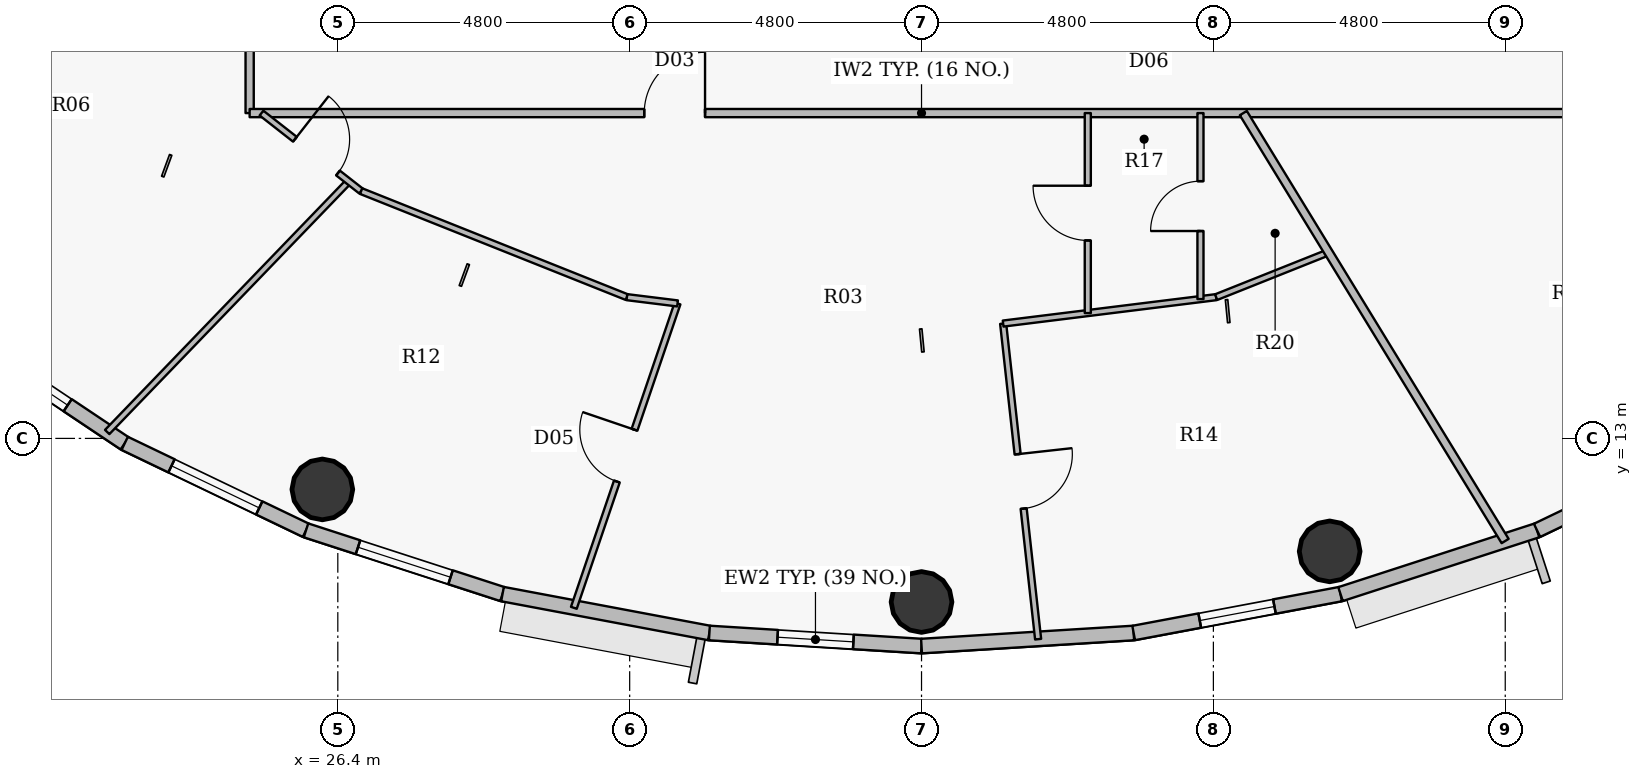
"""IFC4 building model, lengths in metres.
Left out: names, types, materials, properties, quantities, classifications, styles, units other than length and angle.
Written with IfcOpenShell. Run it as: python <this file> out.ifc"""

import sys

from ifc_helpers import new_model, si_unit, direction, frame, frame_2d, origin, origin_2d, place, context, subcontext, project, spatial, rectangle, hollow_circle, extrude, source, transform, mapped, element, fill, save


model = new_model("IFC4")
c1 = context("Model", 3, precision=1e-05, world=origin(), true_north=direction((0.0, 1.0)))
c2 = subcontext(c1, "Body", "Model", "MODEL_VIEW")
j1 = project(units=[si_unit("LENGTHUNIT", "METRE"), si_unit("PLANEANGLEUNIT", "RADIAN")], contexts=[c1])
p1 = place(None, origin())
s1 = spatial("IfcSite", under=j1, at=p1, CompositionType="ELEMENT")
p2 = place(p1, origin())
s2 = spatial("IfcBuilding", under=s1, at=p2, CompositionType="ELEMENT")
p3 = place(p2, frame((0.0, 0.0, 291.75)))
s3 = spatial("IfcBuildingStorey", under=s2, at=p3, CompositionType="ELEMENT", Elevation=291.75)
for number, where, z_axis, x_axis in (
    (1, (26.146, 12.161, 0.0), (0.0, 0.0, 1.0), (1.0, 0.0, 0.0)),
    (2, (36.0, 10.31, 0.0), (0.0, 0.0, 1.0), (1.0, 0.0, 0.0)),
    (3, (42.712, 11.142, 0.0), (0.0, 0.0, 1.0), (1.0, 0.0, 0.0)),
):
    element("IfcColumn", number, at=place(p3, frame(where, z_axis=z_axis, x_axis=x_axis)), inside=s3, PredefinedType="COLUMN", context=c2, shape_type="SweptSolid", body=[
        extrude(hollow_circle(Radius=0.5, WallThickness=0.032, at=origin_2d()), origin(), (0.0, 0.0, 1.0), 3.75),
    ])
p4 = place(p3, frame((22.896, 12.918, 0.0), z_axis=(0.0, 0.0, 1.0), x_axis=(-0.831250592635, 0.55589787933, 0.0)))
e4 = element("IfcWall", 4, at=p4, inside=s3, PredefinedType="SOLIDWALL", context=c2, shape_type="SweptSolid", body=[
    extrude(rectangle(XDim=3.197, YDim=0.24, at=frame_2d((1.599, 0.0))), origin(), (0.0, 0.0, 1.0), 3.5),
])
p5 = place(p4, frame((1.129, 0.0, 0.9)))
e5 = element("IfcOpeningElement", 5, at=p5, cuts=e4, PredefinedType="OPENING", context=c2, shape_type="SweptSolid", body=[
    extrude(rectangle(XDim=1.25, YDim=1.65, at=origin_2d()), frame((0.625, 0.13, 0.825), z_axis=(0.0, -1.0, 0.0), x_axis=(1.0, 0.0, 0.0)), (0.0, 0.0, 1.0), 0.26),
])
p6 = place(p3, frame((25.877, 11.488, 0.0), z_axis=(0.0, 0.0, 1.0), x_axis=(-0.901573741254, 0.43262546051, 0.0)))
e6 = element("IfcWall", 6, at=p6, inside=s3, PredefinedType="SOLIDWALL", context=c2, shape_type="SweptSolid", body=[
    extrude(rectangle(XDim=3.307, YDim=0.24, at=frame_2d((1.653, 0.0))), origin(), (0.0, 0.0, 1.0), 3.5),
])
p7 = place(p6, frame((0.853, 0.0, 0.9)))
e7 = element("IfcOpeningElement", 7, at=p7, cuts=e6, PredefinedType="OPENING", context=c2, shape_type="SweptSolid", body=[
    extrude(rectangle(XDim=1.6, YDim=1.75, at=origin_2d()), frame((0.8, 0.13, 0.875), z_axis=(0.0, -1.0, 0.0), x_axis=(1.0, 0.0, 0.0)), (0.0, 0.0, 1.0), 0.26),
])
p8 = place(p3, frame((29.109, 10.44, 0.0), z_axis=(0.0, 0.0, 1.0), x_axis=(-0.95123136723, 0.308478339592, 0.0)))
e8 = element("IfcWall", 8, at=p8, inside=s3, PredefinedType="SOLIDWALL", context=c2, shape_type="SweptSolid", body=[
    extrude(rectangle(XDim=3.398, YDim=0.24, at=frame_2d((1.699, 0.0))), origin(), (0.0, 0.0, 1.0), 3.5),
])
p9 = place(p8, frame((0.899, 0.0, 0.9)))
e9 = element("IfcOpeningElement", 9, at=p9, cuts=e8, PredefinedType="OPENING", context=c2, shape_type="SweptSolid", body=[
    extrude(rectangle(XDim=1.6, YDim=1.75, at=origin_2d()), frame((0.8, 0.13, 0.875), z_axis=(0.0, -1.0, 0.0), x_axis=(1.0, 0.0, 0.0)), (0.0, 0.0, 1.0), 0.26),
])
p10 = place(p3, frame((32.511, 9.8, 0.0), z_axis=(0.0, 0.0, 1.0), x_axis=(-0.982782655757, 0.184765395959, 0.0)))
e10 = element("IfcWall", 10, at=p10, inside=s3, PredefinedType="SOLIDWALL", context=c2, shape_type="SweptSolid", body=[
    extrude(rectangle(XDim=3.462, YDim=0.24, at=frame_2d((1.731, 0.0))), origin(), (0.0, 0.0, 1.0), 3.5),
])
p11 = place(p3, frame((36.0, 9.585, 0.0), z_axis=(0.0, 0.0, 1.0), x_axis=(-0.998104946479, 0.061534671648, 0.0)))
e11 = element("IfcWall", 11, at=p11, inside=s3, PredefinedType="SOLIDWALL", context=c2, shape_type="SweptSolid", body=[
    extrude(rectangle(XDim=3.495, YDim=0.24, at=frame_2d((1.748, 0.0))), origin(), (0.0, 0.0, 1.0), 3.5),
])
p12 = place(p11, frame((1.123, 0.0, 0.9)))
e12 = element("IfcOpeningElement", 12, at=p12, cuts=e11, PredefinedType="OPENING", context=c2, shape_type="SweptSolid", body=[
    extrude(rectangle(XDim=1.25, YDim=1.65, at=origin_2d()), frame((0.625, 0.13, 0.825), z_axis=(0.0, -1.0, 0.0), x_axis=(1.0, 0.0, 0.0)), (0.0, 0.0, 1.0), 0.26),
])
p13 = place(p3, frame((39.489, 9.8, 0.0), z_axis=(0.0, 0.0, 1.0), x_axis=(-0.998104946479, -0.061534671648, 0.0)))
e13 = element("IfcWall", 13, at=p13, inside=s3, PredefinedType="SOLIDWALL", context=c2, shape_type="SweptSolid", body=[
    extrude(rectangle(XDim=3.495, YDim=0.24, at=frame_2d((1.748, 0.0))), origin(), (0.0, 0.0, 1.0), 3.5),
])
p14 = place(p3, frame((42.891, 10.44, 0.0), z_axis=(0.0, 0.0, 1.0), x_axis=(-0.982782655757, -0.184765395959, 0.0)))
e14 = element("IfcWall", 14, at=p14, inside=s3, PredefinedType="SOLIDWALL", context=c2, shape_type="SweptSolid", body=[
    extrude(rectangle(XDim=3.462, YDim=0.24, at=frame_2d((1.731, 0.0))), origin(), (0.0, 0.0, 1.0), 3.5),
])
p15 = place(p14, frame((1.106, 0.0, 0.9)))
e15 = element("IfcOpeningElement", 15, at=p15, cuts=e14, PredefinedType="OPENING", context=c2, shape_type="SweptSolid", body=[
    extrude(rectangle(XDim=1.25, YDim=1.65, at=origin_2d()), frame((0.625, 0.13, 0.825), z_axis=(0.0, -1.0, 0.0), x_axis=(1.0, 0.0, 0.0)), (0.0, 0.0, 1.0), 0.26),
])
p16 = place(p3, frame((46.123, 11.488, 0.0), z_axis=(0.0, 0.0, 1.0), x_axis=(-0.95123136723, -0.308478339592, 0.0)))
e16 = element("IfcWall", 16, at=p16, inside=s3, PredefinedType="SOLIDWALL", context=c2, shape_type="SweptSolid", body=[
    extrude(rectangle(XDim=3.398, YDim=0.24, at=frame_2d((1.699, 0.0))), origin(), (0.0, 0.0, 1.0), 3.5),
])
p17 = place(p3, frame((49.104, 12.918, 0.0), z_axis=(0.0, 0.0, 1.0), x_axis=(-0.901573741254, -0.43262546051, 0.0)))
e17 = element("IfcWall", 17, at=p17, inside=s3, PredefinedType="SOLIDWALL", context=c2, shape_type="SweptSolid", body=[
    extrude(rectangle(XDim=3.307, YDim=0.24, at=frame_2d((1.653, 0.0))), origin(), (0.0, 0.0, 1.0), 3.5),
])
p18 = place(p17, frame((0.854, 0.0, 0.9)))
e18 = element("IfcOpeningElement", 18, at=p18, cuts=e17, PredefinedType="OPENING", context=c2, shape_type="SweptSolid", body=[
    extrude(rectangle(XDim=1.6, YDim=1.75, at=origin_2d()), frame((0.8, 0.13, 0.875), z_axis=(0.0, -1.0, 0.0), x_axis=(1.0, 0.0, 0.0)), (0.0, 0.0, 1.0), 0.26),
])
p19 = place(p3, frame((16.007, 19.358, 0.0), z_axis=(0.0, 0.0, 1.0), x_axis=(0.934094110355, 0.35702687994, 0.0)))
e19 = element("IfcWall", 19, at=p19, inside=s3, PredefinedType="PARTITIONING", context=c2, shape_type="SweptSolid", body=[
    extrude(rectangle(XDim=9.574, YDim=0.135, at=frame_2d((4.787, 0.0))), origin(), (0.0, 0.0, 1.0), 2.985),
])
p20 = place(p3, frame((22.607, 13.105, 0.0), z_axis=(0.0, 0.0, 1.0), x_axis=(0.693978480191, 0.71999574237, 0.0)))
e20 = element("IfcWall", 20, at=p20, inside=s3, PredefinedType="PARTITIONING", context=c2, shape_type="SweptSolid", body=[
    extrude(rectangle(XDim=5.724, YDim=0.1, at=frame_2d((2.862, 0.0))), origin(), (0.0, 0.0, 1.0), 2.985),
])
p21 = place(p3, frame((24.95, 18.35, 0.0), z_axis=(0.0, 0.0, 1.0), x_axis=(0.0, 1.0, 0.0)))
e21 = element("IfcWall", 21, at=p21, inside=s3, PredefinedType="PARTITIONING", context=c2, shape_type="SweptSolid", body=[
    extrude(rectangle(XDim=11.45, YDim=0.135, at=frame_2d((5.725, 0.0))), origin(), (0.0, 0.0, 1.0), 3.035),
])
p22 = place(p21, frame((7.418, 0.0, 0.0)))
e22 = element("IfcOpeningElement", 22, at=p22, cuts=e21, PredefinedType="OPENING", context=c2, shape_type="SweptSolid", body=[
    extrude(rectangle(XDim=1.0, YDim=2.15, at=origin_2d()), frame((0.5, 0.078, 1.075), z_axis=(0.0, -1.0, 0.0), x_axis=(1.0, 0.0, 0.0)), (0.0, 0.0, 1.0), 0.155),
])
p23 = place(p3, frame((24.95, 18.35, 0.0), z_axis=(0.0, 0.0, 1.0), x_axis=(1.0, 0.0, 0.0)))
e23 = element("IfcWall", 23, at=p23, inside=s3, PredefinedType="PARTITIONING", context=c2, shape_type="SweptSolid", body=[
    extrude(rectangle(XDim=22.1, YDim=0.135, at=frame_2d((11.05, 0.0))), origin(), (0.0, 0.0, 1.0), 3.035),
])
p24 = place(p23, frame((6.49, 0.0, 0.0)))
e24 = element("IfcOpeningElement", 24, at=p24, cuts=e23, PredefinedType="OPENING", context=c2, shape_type="SweptSolid", body=[
    extrude(rectangle(XDim=1.0, YDim=2.15, at=origin_2d()), frame((0.5, 0.078, 1.075), z_axis=(0.0, -1.0, 0.0), x_axis=(1.0, 0.0, 0.0)), (0.0, 0.0, 1.0), 0.155),
])
p25 = place(p3, frame((25.145, 18.35, 0.0), z_axis=(0.0, 0.0, 1.0), x_axis=(0.787326747019, -0.616535962803, 0.0)))
e25 = element("IfcWall", 25, at=p25, inside=s3, PredefinedType="PARTITIONING", context=c2, shape_type="SweptSolid", body=[
    extrude(rectangle(XDim=2.081, YDim=0.1, at=frame_2d((1.041, 0.0))), origin(), (0.0, 0.0, 1.0), 3.5),
])
p26 = place(p25, frame((0.698, 0.0, 0.0)))
e26 = element("IfcOpeningElement", 26, at=p26, cuts=e25, PredefinedType="OPENING", context=c2, shape_type="SweptSolid", body=[
    extrude(rectangle(XDim=0.9, YDim=2.1, at=origin_2d()), frame((0.45, 0.06, 1.05), z_axis=(0.0, -1.0, 0.0), x_axis=(1.0, 0.0, 0.0)), (0.0, 0.0, 1.0), 0.12),
])
p27 = place(p3, frame((26.783, 17.067, 0.0), z_axis=(0.0, 0.0, 1.0), x_axis=(0.928809047774, -0.370558703544, 0.0)))
e27 = element("IfcWall", 27, at=p27, inside=s3, PredefinedType="PARTITIONING", context=c2, shape_type="SweptSolid", body=[
    extrude(rectangle(XDim=4.706, YDim=0.1, at=frame_2d((2.353, 0.0))), origin(), (0.0, 0.0, 1.0), 3.035),
])
p28 = place(p3, frame((30.282, 10.214, 0.0), z_axis=(0.0, 0.0, 1.0), x_axis=(0.322425759237, 0.946594754782, 0.0)))
e28 = element("IfcWall", 28, at=p28, inside=s3, PredefinedType="PARTITIONING", context=c2, shape_type="SweptSolid", body=[
    extrude(rectangle(XDim=5.288, YDim=0.1, at=frame_2d((2.644, 0.0))), origin(), (0.0, 0.0, 1.0), 2.985),
])
p29 = place(p28, frame((2.194, 0.0, 0.0)))
e29 = element("IfcOpeningElement", 29, at=p29, cuts=e28, PredefinedType="OPENING", context=c2, shape_type="SweptSolid", body=[
    extrude(rectangle(XDim=0.9, YDim=2.1, at=origin_2d()), frame((0.45, 0.06, 1.05), z_axis=(0.0, -1.0, 0.0), x_axis=(1.0, 0.0, 0.0)), (0.0, 0.0, 1.0), 0.12),
])
p30 = place(p3, frame((31.155, 15.323, 0.0), z_axis=(0.0, 0.0, 1.0), x_axis=(0.992393849535, -0.123103401277, 0.0)))
e30 = element("IfcWall", 30, at=p30, inside=s3, PredefinedType="PARTITIONING", context=c2, shape_type="SweptSolid", body=[
    extrude(rectangle(XDim=0.839, YDim=0.1, at=frame_2d((0.419, 0.0))), origin(), (0.0, 0.0, 1.0), 3.5),
])
p31 = place(p3, frame((37.342, 14.888, 0.0), z_axis=(0.0, 0.0, 1.0), x_axis=(0.110149295127, -0.993915053102, 0.0)))
e31 = element("IfcWall", 31, at=p31, inside=s3, PredefinedType="PARTITIONING", context=c2, shape_type="SweptSolid", body=[
    extrude(rectangle(XDim=5.222, YDim=0.1, at=frame_2d((2.611, 0.0))), origin(), (0.0, 0.0, 1.0), 2.985),
])
p32 = place(p31, frame((2.161, 0.0, 0.0)))
e32 = element("IfcOpeningElement", 32, at=p32, cuts=e31, PredefinedType="OPENING", context=c2, shape_type="SweptSolid", body=[
    extrude(rectangle(XDim=0.9, YDim=2.1, at=origin_2d()), frame((0.45, 0.06, 1.05), z_axis=(0.0, -1.0, 0.0), x_axis=(1.0, 0.0, 0.0)), (0.0, 0.0, 1.0), 0.12),
])
p33 = place(p3, frame((37.342, 14.888, 0.0), z_axis=(0.0, 0.0, 1.0), x_axis=(0.992393420873, 0.123106856865, 0.0)))
e33 = element("IfcWall", 33, at=p33, inside=s3, PredefinedType="PARTITIONING", context=c2, shape_type="SweptSolid", body=[
    extrude(rectangle(XDim=3.53, YDim=0.1, at=frame_2d((1.765, 0.0))), origin(), (0.0, 0.0, 1.0), 3.035),
])
p34 = place(p3, frame((38.734, 15.061, 0.0), z_axis=(0.0, 0.0, 1.0), x_axis=(0.0, 1.0, 0.0)))
e34 = element("IfcWall", 34, at=p34, inside=s3, PredefinedType="PARTITIONING", context=c2, shape_type="SweptSolid", body=[
    extrude(rectangle(XDim=3.289, YDim=0.1, at=frame_2d((1.645, 0.0))), origin(), (0.0, 0.0, 1.0), 3.5),
])
p35 = place(p34, frame((1.194, 0.0, 0.0)))
e35 = element("IfcOpeningElement", 35, at=p35, cuts=e34, PredefinedType="OPENING", context=c2, shape_type="SweptSolid", body=[
    extrude(rectangle(XDim=0.9, YDim=2.1, at=origin_2d()), frame((0.45, 0.06, 1.05), z_axis=(0.0, -1.0, 0.0), x_axis=(1.0, 0.0, 0.0)), (0.0, 0.0, 1.0), 0.12),
])
p36 = place(p3, frame((40.587, 15.291, 0.0), z_axis=(0.0, 0.0, 1.0), x_axis=(0.0, 1.0, 0.0)))
e36 = element("IfcWall", 36, at=p36, inside=s3, PredefinedType="PARTITIONING", context=c2, shape_type="SweptSolid", body=[
    extrude(rectangle(XDim=3.059, YDim=0.1, at=frame_2d((1.53, 0.0))), origin(), (0.0, 0.0, 1.0), 3.035),
])
p37 = place(p36, frame((1.119, 0.0, 0.0)))
e37 = element("IfcOpeningElement", 37, at=p37, cuts=e36, PredefinedType="OPENING", context=c2, shape_type="SweptSolid", body=[
    extrude(rectangle(XDim=0.82, YDim=2.1, at=origin_2d()), frame((0.41, 0.06, 1.05), z_axis=(0.0, -1.0, 0.0), x_axis=(1.0, 0.0, 0.0)), (0.0, 0.0, 1.0), 0.12),
])
p38 = place(p3, frame((40.845, 15.323, 0.0), z_axis=(0.0, 0.0, 1.0), x_axis=(0.928797929692, 0.370586569913, 0.0)))
e38 = element("IfcWall", 38, at=p38, inside=s3, PredefinedType="PARTITIONING", context=c2, shape_type="SweptSolid", body=[
    extrude(rectangle(XDim=1.99, YDim=0.1, at=frame_2d((0.995, 0.0))), origin(), (0.0, 0.0, 1.0), 3.035),
])
p39 = place(p3, frame((41.292, 18.35, 0.0), z_axis=(0.0, 0.0, 1.0), x_axis=(0.521891606098, -0.853011812043, 0.0)))
e39 = element("IfcWall", 39, at=p39, inside=s3, PredefinedType="PARTITIONING", context=c2, shape_type="SweptSolid", body=[
    extrude(rectangle(XDim=8.25, YDim=0.135, at=frame_2d((4.125, 0.0))), origin(), (0.0, 0.0, 1.0), 2.985),
])
m1 = source(origin(), c2, "Body", "SweptSolid", [
    extrude(rectangle(XDim=1.25, YDim=1.65, at=origin_2d()), frame((0.625, 0.03, 0.825), z_axis=(0.0, -1.0, 0.0), x_axis=(1.0, 0.0, 0.0)), (0.0, 0.0, 1.0), 0.06),
])
p40 = place(p5, origin())
e40 = element("IfcWindow", 40, at=p40, inside=s3, PartitioningType="SINGLE_PANEL", PredefinedType="WINDOW", context=c2, shape_type="MappedRepresentation", body=[
    mapped(m1, transform((0.0, 0.0, 0.0), x_axis=(1.0, 0.0, 0.0), y_axis=(0.0, 1.0, 0.0), z_axis=(0.0, 0.0, 1.0), scale=1.0)),
])
fill(e5, e40)
m2 = source(origin(), c2, "Body", "SweptSolid", [
    extrude(rectangle(XDim=1.6, YDim=1.75, at=origin_2d()), frame((0.8, 0.03, 0.875), z_axis=(0.0, -1.0, 0.0), x_axis=(1.0, 0.0, 0.0)), (0.0, 0.0, 1.0), 0.06),
])
p41 = place(p7, origin())
e41 = element("IfcWindow", 41, at=p41, inside=s3, PartitioningType="DOUBLE_PANEL_VERTICAL", PredefinedType="WINDOW", context=c2, shape_type="MappedRepresentation", body=[
    mapped(m2, transform((0.0, 0.0, 0.0), x_axis=(1.0, 0.0, 0.0), y_axis=(0.0, 1.0, 0.0), z_axis=(0.0, 0.0, 1.0), scale=1.0)),
])
fill(e7, e41)
p42 = place(p9, origin())
e42 = element("IfcWindow", 42, at=p42, inside=s3, PartitioningType="DOUBLE_PANEL_VERTICAL", PredefinedType="WINDOW", context=c2, shape_type="MappedRepresentation", body=[
    mapped(m2, transform((0.0, 0.0, 0.0), x_axis=(1.0, 0.0, 0.0), y_axis=(0.0, 1.0, 0.0), z_axis=(0.0, 0.0, 1.0), scale=1.0)),
])
fill(e9, e42)
p43 = place(p12, origin())
e43 = element("IfcWindow", 43, at=p43, inside=s3, PartitioningType="SINGLE_PANEL", PredefinedType="WINDOW", context=c2, shape_type="MappedRepresentation", body=[
    mapped(m1, transform((0.0, 0.0, 0.0), x_axis=(1.0, 0.0, 0.0), y_axis=(0.0, 1.0, 0.0), z_axis=(0.0, 0.0, 1.0), scale=1.0)),
])
fill(e12, e43)
p44 = place(p15, origin())
e44 = element("IfcWindow", 44, at=p44, inside=s3, PartitioningType="SINGLE_PANEL", PredefinedType="WINDOW", context=c2, shape_type="MappedRepresentation", body=[
    mapped(m1, transform((0.0, 0.0, 0.0), x_axis=(1.0, 0.0, 0.0), y_axis=(0.0, 1.0, 0.0), z_axis=(0.0, 0.0, 1.0), scale=1.0)),
])
fill(e15, e44)
m3 = source(origin(), c2, "Body", "SweptSolid", [
    extrude(rectangle(XDim=1.0, YDim=2.15, at=origin_2d()), frame((0.5, 0.025, 1.075), z_axis=(0.0, -1.0, 0.0), x_axis=(1.0, 0.0, 0.0)), (0.0, 0.0, 1.0), 0.05),
])
p45 = place(p24, origin())
e45 = element("IfcDoor", 45, at=p45, inside=s3, OperationType="SINGLE_SWING_RIGHT", PredefinedType="DOOR", context=c2, shape_type="MappedRepresentation", body=[
    mapped(m3, transform((0.0, 0.0, 0.0), x_axis=(1.0, 0.0, 0.0), y_axis=(0.0, 1.0, 0.0), z_axis=(0.0, 0.0, 1.0), scale=1.0)),
])
fill(e24, e45)
m4 = source(origin(), c2, "Body", "SweptSolid", [
    extrude(rectangle(XDim=0.9, YDim=2.1, at=origin_2d()), frame((0.45, 0.025, 1.05), z_axis=(0.0, -1.0, 0.0), x_axis=(1.0, 0.0, 0.0)), (0.0, 0.0, 1.0), 0.05),
])
p46 = place(p26, origin())
e46 = element("IfcDoor", 46, at=p46, inside=s3, OperationType="SINGLE_SWING_LEFT", PredefinedType="DOOR", context=c2, shape_type="MappedRepresentation", body=[
    mapped(m4, transform((0.0, 0.0, 0.0), x_axis=(1.0, 0.0, 0.0), y_axis=(0.0, 1.0, 0.0), z_axis=(0.0, 0.0, 1.0), scale=1.0)),
])
fill(e26, e46)
p47 = place(p29, origin())
e47 = element("IfcDoor", 47, at=p47, inside=s3, OperationType="SINGLE_SWING_RIGHT", PredefinedType="DOOR", context=c2, shape_type="MappedRepresentation", body=[
    mapped(m4, transform((0.0, 0.0, 0.0), x_axis=(1.0, 0.0, 0.0), y_axis=(0.0, 1.0, 0.0), z_axis=(0.0, 0.0, 1.0), scale=1.0)),
])
fill(e29, e47)
p48 = place(p32, origin())
e48 = element("IfcDoor", 48, at=p48, inside=s3, OperationType="SINGLE_SWING_LEFT", PredefinedType="DOOR", context=c2, shape_type="MappedRepresentation", body=[
    mapped(m4, transform((0.0, 0.0, 0.0), x_axis=(1.0, 0.0, 0.0), y_axis=(0.0, 1.0, 0.0), z_axis=(0.0, 0.0, 1.0), scale=1.0)),
])
fill(e32, e48)
p49 = place(p35, origin())
e49 = element("IfcDoor", 49, at=p49, inside=s3, OperationType="SINGLE_SWING_RIGHT", PredefinedType="DOOR", context=c2, shape_type="MappedRepresentation", body=[
    mapped(m4, transform((0.0, 0.0, 0.0), x_axis=(1.0, 0.0, 0.0), y_axis=(0.0, 1.0, 0.0), z_axis=(0.0, 0.0, 1.0), scale=1.0)),
])
fill(e35, e49)
m5 = source(origin(), c2, "Body", "SweptSolid", [
    extrude(rectangle(XDim=0.82, YDim=2.1, at=origin_2d()), frame((0.41, 0.025, 1.05), z_axis=(0.0, -1.0, 0.0), x_axis=(1.0, 0.0, 0.0)), (0.0, 0.0, 1.0), 0.05),
])
p50 = place(p37, origin())
e50 = element("IfcDoor", 50, at=p50, inside=s3, OperationType="SINGLE_SWING_LEFT", PredefinedType="DOOR", context=c2, shape_type="MappedRepresentation", body=[
    mapped(m5, transform((0.0, 0.0, 0.0), x_axis=(1.0, 0.0, 0.0), y_axis=(0.0, 1.0, 0.0), z_axis=(0.0, 0.0, 1.0), scale=1.0)),
])
fill(e37, e50)
save(model, sys.argv[1])
